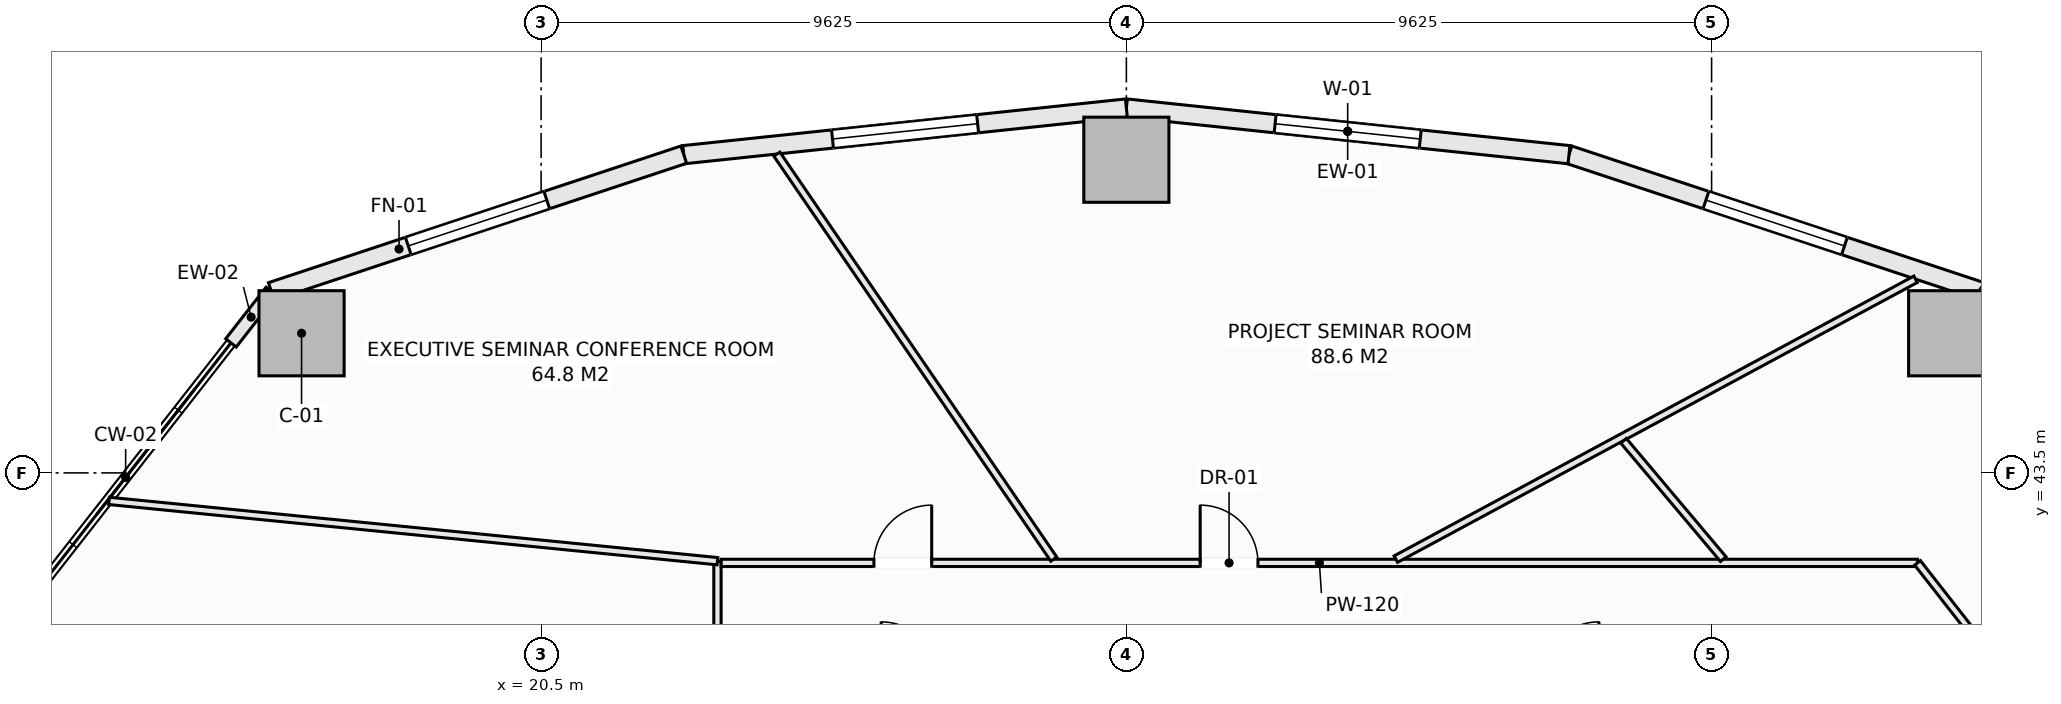
"""IFC4 building model, lengths in metres.
Left out: names, types, materials, properties, quantities, classifications, styles, units other than length and angle.
Written with IfcOpenShell. Run it as: python <this file> out.ifc"""

import sys

from ifc_helpers import new_model, si_unit, direction, frame, frame_2d, origin, origin_2d, place, context, subcontext, project, spatial, rectangle, extrude, element, fill, save


model = new_model("IFC4")
c1 = context("Model", 3, precision=1e-05, world=origin(), true_north=direction((0.0, 1.0)))
c2 = subcontext(c1, "Body", "Model", "MODEL_VIEW")
j1 = project(units=[si_unit("LENGTHUNIT", "METRE"), si_unit("PLANEANGLEUNIT", "RADIAN")], contexts=[c1])
p1 = place(None, origin())
s1 = spatial("IfcSite", under=j1, at=p1, CompositionType="ELEMENT")
p2 = place(p1, origin())
s2 = spatial("IfcBuilding", under=s1, at=p2, CompositionType="ELEMENT")
p3 = place(p2, frame((0.0, 0.0, 38.05)))
s3 = spatial("IfcBuildingStorey", under=s2, at=p3, CompositionType="ELEMENT", Elevation=38.05)
for number, where, z_axis, x_axis in (
    (1, (43.69, 45.796, -0.28), (0.0, 0.0, 1.0), (1.0, 0.0, 0.0)),
    (2, (30.125, 48.65, -0.28), (0.0, 0.0, 1.0), (1.0, 0.0, 0.0)),
    (3, (16.56, 45.796, -0.28), (0.0, 0.0, 1.0), (1.0, 0.0, 0.0)),
):
    element("IfcColumn", number, at=place(p3, frame(where, z_axis=z_axis, x_axis=x_axis)), inside=s3, PredefinedType="COLUMN", context=c2, shape_type="SweptSolid", body=[
        extrude(rectangle(XDim=1.4, YDim=1.4, at=origin_2d()), origin(), (0.0, 0.0, 1.0), 3.85),
    ])
p4 = place(p3, frame((44.188, 46.486, 0.0), z_axis=(0.0, 0.0, 1.0), x_axis=(0.616421309777, -0.787416515482, 0.0)))
e4 = element("IfcWall", 4, at=p4, inside=s3, PredefinedType="SOLIDWALL", context=c2, shape_type="SweptSolid", body=[
    extrude(rectangle(XDim=6.696, YDim=0.3, at=frame_2d((3.348, 0.0))), origin(), (0.0, 0.0, 1.0), 3.093),
])
p5 = place(p4, frame((2.148, 0.0, 0.85)))
e5 = element("IfcOpeningElement", 5, at=p5, cuts=e4, PredefinedType="OPENING", context=c2, shape_type="SweptSolid", body=[
    extrude(rectangle(XDim=2.4, YDim=1.9, at=frame_2d((1.2, 0.95))), frame((0.0, 0.16, 0.0), z_axis=(0.0, -1.0, 0.0), x_axis=(1.0, 0.0, 0.0)), (0.0, 0.0, 1.0), 0.32),
])
p6 = place(p3, frame((37.404, 48.733, 0.0), z_axis=(0.0, 0.0, 1.0), x_axis=(0.949238715533, -0.31455661006, 0.0)))
e6 = element("IfcWall", 6, at=p6, inside=s3, PredefinedType="SOLIDWALL", context=c2, shape_type="SweptSolid", body=[
    extrude(rectangle(XDim=7.146, YDim=0.3, at=frame_2d((3.573, 0.0))), origin(), (0.0, 0.0, 1.0), 3.093),
])
p7 = place(p6, frame((2.373, 0.0, 0.85)))
e7 = element("IfcOpeningElement", 7, at=p7, cuts=e6, PredefinedType="OPENING", context=c2, shape_type="SweptSolid", body=[
    extrude(rectangle(XDim=2.4, YDim=1.9, at=frame_2d((1.2, 0.95))), frame((0.0, 0.16, 0.0), z_axis=(0.0, -1.0, 0.0), x_axis=(1.0, 0.0, 0.0)), (0.0, 0.0, 1.0), 0.32),
])
p8 = place(p3, frame((30.125, 49.5, 0.0), z_axis=(0.0, 0.0, 1.0), x_axis=(0.994500334317, -0.104733399844, 0.0)))
e8 = element("IfcWall", 8, at=p8, inside=s3, PredefinedType="SOLIDWALL", context=c2, shape_type="SweptSolid", body=[
    extrude(rectangle(XDim=7.32, YDim=0.3, at=frame_2d((3.66, 0.0))), origin(), (0.0, 0.0, 1.0), 3.093),
])
p9 = place(p8, frame((2.46, 0.0, 0.85)))
e9 = element("IfcOpeningElement", 9, at=p9, cuts=e8, PredefinedType="OPENING", context=c2, shape_type="SweptSolid", body=[
    extrude(rectangle(XDim=2.4, YDim=1.9, at=frame_2d((1.2, 0.95))), frame((0.0, 0.16, 0.0), z_axis=(0.0, -1.0, 0.0), x_axis=(1.0, 0.0, 0.0)), (0.0, 0.0, 1.0), 0.32),
])
p10 = place(p3, frame((22.846, 48.733, 0.0), z_axis=(0.0, 0.0, 1.0), x_axis=(0.994500334317, 0.104733399844, 0.0)))
e10 = element("IfcWall", 10, at=p10, inside=s3, PredefinedType="SOLIDWALL", context=c2, shape_type="SweptSolid", body=[
    extrude(rectangle(XDim=7.32, YDim=0.3, at=frame_2d((3.66, 0.0))), origin(), (0.0, 0.0, 1.0), 3.093),
])
p11 = place(p10, frame((2.46, 0.0, 0.85)))
e11 = element("IfcOpeningElement", 11, at=p11, cuts=e10, PredefinedType="OPENING", context=c2, shape_type="SweptSolid", body=[
    extrude(rectangle(XDim=2.4, YDim=1.9, at=frame_2d((1.2, 0.95))), frame((0.0, 0.16, 0.0), z_axis=(0.0, -1.0, 0.0), x_axis=(1.0, 0.0, 0.0)), (0.0, 0.0, 1.0), 0.32),
])
p12 = place(p3, frame((16.062, 46.486, 0.0), z_axis=(0.0, 0.0, 1.0), x_axis=(0.949238715533, 0.31455661006, 0.0)))
e12 = element("IfcWall", 12, at=p12, inside=s3, PredefinedType="SOLIDWALL", context=c2, shape_type="SweptSolid", body=[
    extrude(rectangle(XDim=7.146, YDim=0.3, at=frame_2d((3.573, 0.0))), origin(), (0.0, 0.0, 1.0), 3.093),
])
p13 = place(p12, frame((2.373, 0.0, 0.85)))
e13 = element("IfcOpeningElement", 13, at=p13, cuts=e12, PredefinedType="OPENING", context=c2, shape_type="SweptSolid", body=[
    extrude(rectangle(XDim=2.4, YDim=1.9, at=frame_2d((1.2, 0.95))), frame((0.0, 0.16, 0.0), z_axis=(0.0, -1.0, 0.0), x_axis=(1.0, 0.0, 0.0)), (0.0, 0.0, 1.0), 0.32),
])
p14 = place(p3, frame((15.399, 45.638, 0.0), z_axis=(0.0, 0.0, 1.0), x_axis=(0.616528421162, 0.787332652632, 0.0)))
e14 = element("IfcWall", 14, at=p14, inside=s3, PredefinedType="SOLIDWALL", context=c2, shape_type="SweptSolid", body=[
    extrude(rectangle(XDim=1.076, YDim=0.22, at=frame_2d((0.538, 0.0))), origin(), (0.0, 0.0, 1.0), 3.093),
])
p15 = place(p3, frame((23.4, 40.162, 0.0), z_axis=(0.0, 0.0, 1.0), x_axis=(0.0, 1.0, 0.0)))
e15 = element("IfcWall", 15, at=p15, inside=s3, PredefinedType="PARTITIONING", context=c2, shape_type="SweptSolid", body=[
    extrude(rectangle(XDim=1.886, YDim=0.12, at=frame_2d((0.943, 0.0))), origin(), (0.0, 0.0, 1.0), 3.57),
])
p16 = place(p3, frame((23.462, 42.02, 0.0), z_axis=(0.0, 0.0, 1.0), x_axis=(1.0, 0.0, 0.0)))
e16 = element("IfcWall", 16, at=p16, inside=s3, PredefinedType="PARTITIONING", context=c2, shape_type="SweptSolid", body=[
    extrude(rectangle(XDim=19.675, YDim=0.12, at=frame_2d((9.837, 0.0))), origin(), (0.0, 0.0, 1.0), 3.57),
])
p17 = place(p16, frame((7.877, 0.0, 0.0)))
e17 = element("IfcOpeningElement", 17, at=p17, cuts=e16, PredefinedType="OPENING", context=c2, shape_type="SweptSolid", body=[
    extrude(rectangle(XDim=0.95, YDim=2.1, at=frame_2d((0.475, 1.05))), frame((0.0, 0.07, 0.0), z_axis=(0.0, -1.0, 0.0), x_axis=(1.0, 0.0, 0.0)), (0.0, 0.0, 1.0), 0.14),
])
p18 = place(p16, frame((2.511, 0.0, 0.0)))
e18 = element("IfcOpeningElement", 18, at=p18, cuts=e16, PredefinedType="OPENING", context=c2, shape_type="SweptSolid", body=[
    extrude(rectangle(XDim=0.95, YDim=2.1, at=frame_2d((0.475, 1.05))), frame((0.0, 0.07, 0.0), z_axis=(0.0, -1.0, 0.0), x_axis=(1.0, 0.0, 0.0)), (0.0, 0.0, 1.0), 0.14),
])
p19 = place(p3, frame((43.137, 42.02, 0.0), z_axis=(0.0, 0.0, 1.0), x_axis=(0.616441660183, -0.787400583941, 0.0)))
e19 = element("IfcWall", 19, at=p19, inside=s3, PredefinedType="PARTITIONING", context=c2, shape_type="SweptSolid", body=[
    extrude(rectangle(XDim=5.083, YDim=0.12, at=frame_2d((2.541, 0.0))), origin(), (0.0, 0.0, 1.0), 3.57),
])
p20 = place(p19, frame((3.326, 0.0, 0.0)))
e20 = element("IfcOpeningElement", 20, at=p20, cuts=e19, PredefinedType="OPENING", context=c2, shape_type="SweptSolid", body=[
    extrude(rectangle(XDim=0.95, YDim=2.1, at=frame_2d((0.475, 1.05))), frame((0.0, 0.07, 0.0), z_axis=(0.0, -1.0, 0.0), x_axis=(1.0, 0.0, 0.0)), (0.0, 0.0, 1.0), 0.14),
])
p21 = place(p3, frame((34.557, 42.082, 0.0), z_axis=(0.0, 0.0, 1.0), x_axis=(0.880504205361, 0.474038336362, 0.0)))
e21 = element("IfcWall", 21, at=p21, inside=s3, PredefinedType="PARTITIONING", context=c2, shape_type="SweptSolid", body=[
    extrude(rectangle(XDim=9.708, YDim=0.12, at=frame_2d((4.854, 0.0))), origin(), (0.0, 0.0, 1.0), 3.57),
])
p22 = place(p3, frame((38.302, 44.028, 0.0), z_axis=(0.0, 0.0, 1.0), x_axis=(0.644336623354, -0.764741992965, 0.0)))
e22 = element("IfcWall", 22, at=p22, inside=s3, PredefinedType="PARTITIONING", context=c2, shape_type="SweptSolid", body=[
    extrude(rectangle(XDim=2.545, YDim=0.12, at=frame_2d((1.272, 0.0))), origin(), (0.0, 0.0, 1.0), 3.57),
])
p23 = place(p3, frame((24.377, 48.742, 0.0), z_axis=(0.0, 0.0, 1.0), x_axis=(0.56452118845, -0.825418577323, 0.0)))
e23 = element("IfcWall", 23, at=p23, inside=s3, PredefinedType="PARTITIONING", context=c2, shape_type="SweptSolid", body=[
    extrude(rectangle(XDim=8.068, YDim=0.12, at=frame_2d((4.034, 0.0))), origin(), (0.0, 0.0, 1.0), 3.57),
])
p24 = place(p3, frame((13.394, 43.04, 0.0), z_axis=(0.0, 0.0, 1.0), x_axis=(0.995126223096, -0.09860933073, 0.0)))
e24 = element("IfcWall", 24, at=p24, inside=s3, PredefinedType="PARTITIONING", context=c2, shape_type="SweptSolid", body=[
    extrude(rectangle(XDim=10.054, YDim=0.12, at=frame_2d((5.027, 0.0))), origin(), (0.0, 0.0, 1.0), 3.57),
])
p25 = place(p7, origin())
e25 = element("IfcWindow", 25, at=p25, inside=s3, PartitioningType="SINGLE_PANEL", PredefinedType="WINDOW", context=c2, shape_type="SweptSolid", body=[
    extrude(rectangle(XDim=2.4, YDim=1.9, at=frame_2d((1.2, 0.95))), frame((0.0, 0.03, 0.0), z_axis=(0.0, -1.0, 0.0), x_axis=(1.0, 0.0, 0.0)), (0.0, 0.0, 1.0), 0.06),
])
fill(e7, e25)
p26 = place(p9, origin())
e26 = element("IfcWindow", 26, at=p26, inside=s3, PartitioningType="SINGLE_PANEL", PredefinedType="WINDOW", context=c2, shape_type="SweptSolid", body=[
    extrude(rectangle(XDim=2.4, YDim=1.9, at=frame_2d((1.2, 0.95))), frame((0.0, 0.03, 0.0), z_axis=(0.0, -1.0, 0.0), x_axis=(1.0, 0.0, 0.0)), (0.0, 0.0, 1.0), 0.06),
])
fill(e9, e26)
p27 = place(p11, origin())
e27 = element("IfcWindow", 27, at=p27, inside=s3, PartitioningType="SINGLE_PANEL", PredefinedType="WINDOW", context=c2, shape_type="SweptSolid", body=[
    extrude(rectangle(XDim=2.4, YDim=1.9, at=frame_2d((1.2, 0.95))), frame((0.0, 0.03, 0.0), z_axis=(0.0, -1.0, 0.0), x_axis=(1.0, 0.0, 0.0)), (0.0, 0.0, 1.0), 0.06),
])
fill(e11, e27)
p28 = place(p13, origin())
e28 = element("IfcWindow", 28, at=p28, inside=s3, PartitioningType="SINGLE_PANEL", PredefinedType="WINDOW", context=c2, shape_type="SweptSolid", body=[
    extrude(rectangle(XDim=2.4, YDim=1.9, at=frame_2d((1.2, 0.95))), frame((0.0, 0.03, 0.0), z_axis=(0.0, -1.0, 0.0), x_axis=(1.0, 0.0, 0.0)), (0.0, 0.0, 1.0), 0.06),
])
fill(e13, e28)
p29 = place(p17, origin())
e29 = element("IfcDoor", 29, at=p29, inside=s3, OperationType="SINGLE_SWING_LEFT", PredefinedType="DOOR", context=c2, shape_type="SweptSolid", body=[
    extrude(rectangle(XDim=0.95, YDim=2.1, at=frame_2d((0.475, 1.05))), frame((0.0, 0.025, 0.0), z_axis=(0.0, -1.0, 0.0), x_axis=(1.0, 0.0, 0.0)), (0.0, 0.0, 1.0), 0.05),
])
fill(e17, e29)
p30 = place(p18, origin())
e30 = element("IfcDoor", 30, at=p30, inside=s3, OperationType="SINGLE_SWING_RIGHT", PredefinedType="DOOR", context=c2, shape_type="SweptSolid", body=[
    extrude(rectangle(XDim=0.95, YDim=2.1, at=frame_2d((0.475, 1.05))), frame((0.0, 0.025, 0.0), z_axis=(0.0, -1.0, 0.0), x_axis=(1.0, 0.0, 0.0)), (0.0, 0.0, 1.0), 0.05),
])
fill(e18, e30)
save(model, sys.argv[1])
